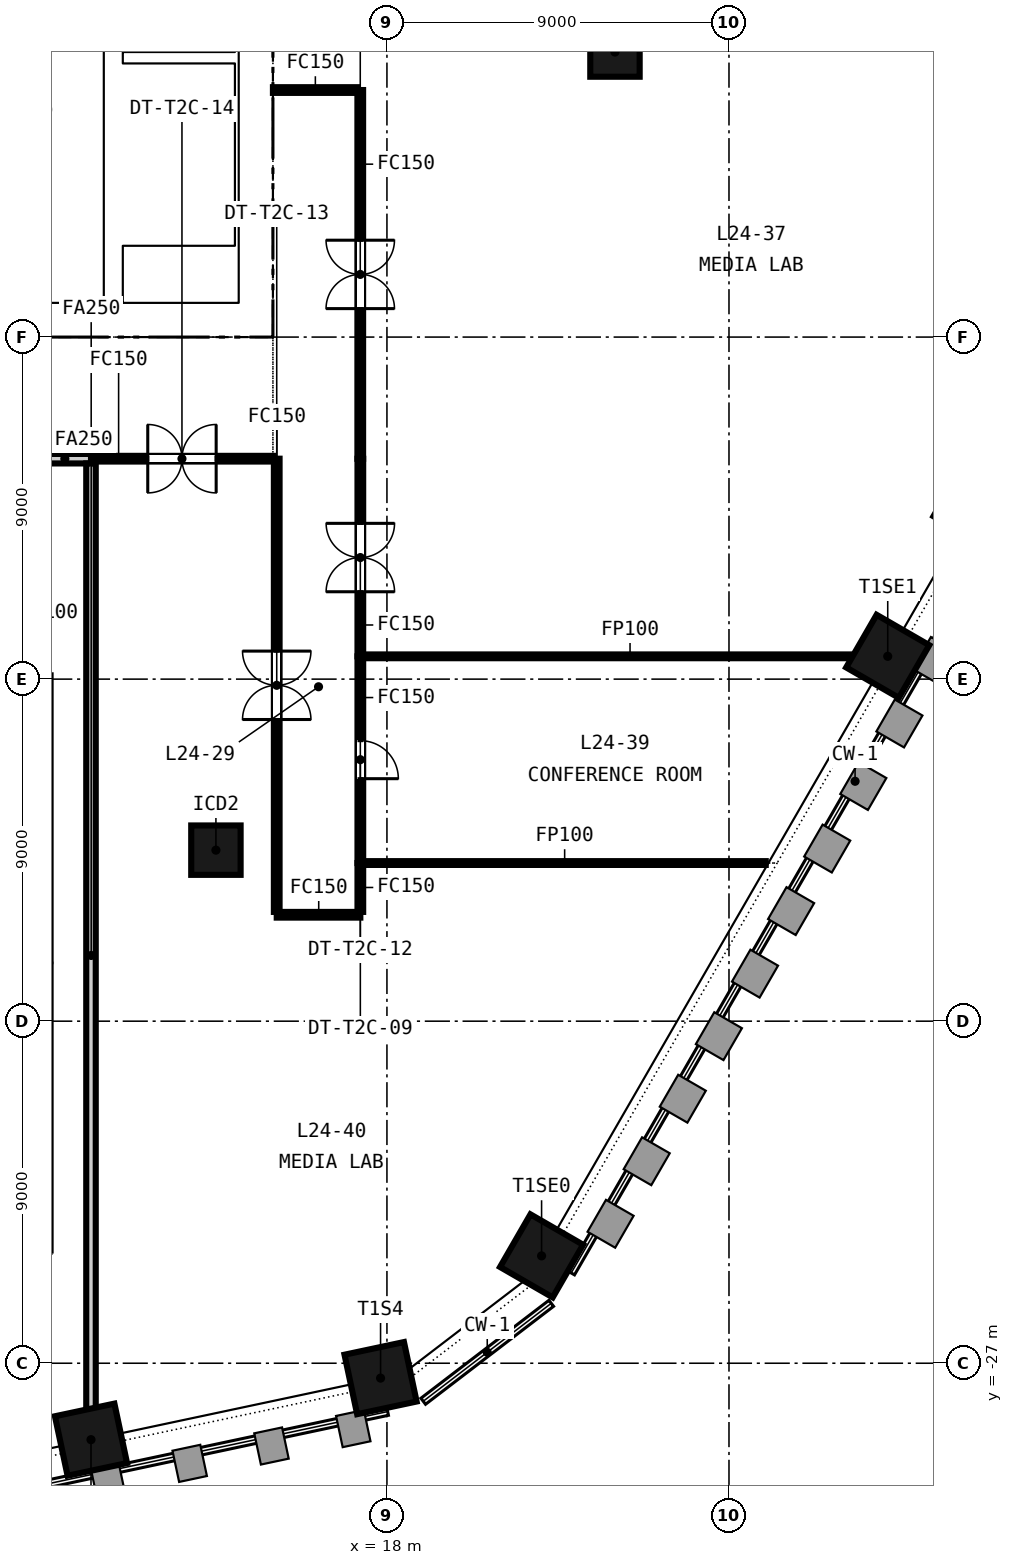
"""IFC4 building model, lengths in metres.
Left out: names, types, materials, properties, quantities, classifications, styles, units other than length and angle.
Written with IfcOpenShell. Run it as: python <this file> out.ifc"""

import sys

from ifc_helpers import new_model, si_unit, direction, frame, frame_2d, origin, origin_2d, place, context, subcontext, project, spatial, rectangle, extrude, element, fill, save


model = new_model("IFC4")
c1 = context("Model", 3, precision=1e-05, world=origin(), true_north=direction((0.0, 1.0)))
c2 = subcontext(c1, "Body", "Model", "MODEL_VIEW")
j1 = project(units=[si_unit("LENGTHUNIT", "METRE"), si_unit("PLANEANGLEUNIT", "RADIAN")], contexts=[c1])
p1 = place(None, origin())
s1 = spatial("IfcSite", under=j1, at=p1, CompositionType="ELEMENT")
p2 = place(p1, origin())
s2 = spatial("IfcBuilding", under=s1, at=p2, CompositionType="ELEMENT")
p3 = place(p2, frame((0.0, 0.0, 102.55)))
s3 = spatial("IfcBuildingStorey", under=s2, at=p3, CompositionType="ELEMENT", Elevation=102.55)
p4 = place(p3, frame((-15.0, 0.45, -0.15), z_axis=(0.0, 0.0, 1.0), x_axis=(1.0, 0.0, 0.0)))
e1 = element("IfcWall", 1, at=p4, inside=s3, PredefinedType="SOLIDWALL", context=c2, shape_type="SweptSolid", body=[
    extrude(rectangle(XDim=30.0, YDim=0.9, at=frame_2d((15.0, 0.0))), origin(), (0.0, 0.0, 1.0), 3.65),
])
p5 = place(p4, frame((5.8, 0.0, 0.15)))
e2 = element("IfcOpeningElement", 2, at=p5, cuts=e1, PredefinedType="OPENING", context=c2, shape_type="SweptSolid", body=[
    extrude(rectangle(XDim=2.4, YDim=2.4, at=frame_2d((1.2, 1.2))), frame((0.0, 0.46, 0.0), z_axis=(0.0, -1.0, 0.0), x_axis=(1.0, 0.0, 0.0)), (0.0, 0.0, 1.0), 0.92),
])
p6 = place(p4, frame((13.8, 0.0, 0.15)))
e3 = element("IfcOpeningElement", 3, at=p6, cuts=e1, PredefinedType="OPENING", context=c2, shape_type="SweptSolid", body=[
    extrude(rectangle(XDim=2.4, YDim=2.4, at=frame_2d((1.2, 1.2))), frame((0.0, 0.46, 0.0), z_axis=(0.0, -1.0, 0.0), x_axis=(1.0, 0.0, 0.0)), (0.0, 0.0, 1.0), 0.92),
])
p7 = place(p4, frame((21.8, 0.0, 0.15)))
e4 = element("IfcOpeningElement", 4, at=p7, cuts=e1, PredefinedType="OPENING", context=c2, shape_type="SweptSolid", body=[
    extrude(rectangle(XDim=2.4, YDim=2.4, at=frame_2d((1.2, 1.2))), frame((0.0, 0.46, 0.0), z_axis=(0.0, -1.0, 0.0), x_axis=(1.0, 0.0, 0.0)), (0.0, 0.0, 1.0), 0.92),
])
p8 = place(p4, frame((1.5, 0.0, 0.15)))
e5 = element("IfcOpeningElement", 5, at=p8, cuts=e1, PredefinedType="OPENING", context=c2, shape_type="SweptSolid", body=[
    extrude(rectangle(XDim=1.2, YDim=2.1, at=frame_2d((0.6, 1.05))), frame((0.0, 0.46, 0.0), z_axis=(0.0, -1.0, 0.0), x_axis=(1.0, 0.0, 0.0)), (0.0, 0.0, 1.0), 0.92),
])
p9 = place(p4, frame((27.3, 0.0, 0.15)))
e6 = element("IfcOpeningElement", 6, at=p9, cuts=e1, PredefinedType="OPENING", context=c2, shape_type="SweptSolid", body=[
    extrude(rectangle(XDim=1.2, YDim=2.1, at=frame_2d((0.6, 1.05))), frame((0.0, 0.46, 0.0), z_axis=(0.0, -1.0, 0.0), x_axis=(1.0, 0.0, 0.0)), (0.0, 0.0, 1.0), 0.92),
])
p10 = place(p3, frame((14.55, 0.9, -0.15), z_axis=(0.0, 0.0, 1.0), x_axis=(0.0, 1.0, 0.0)))
e7 = element("IfcWall", 7, at=p10, inside=s3, PredefinedType="SOLIDWALL", context=c2, shape_type="SweptSolid", body=[
    extrude(rectangle(XDim=13.2, YDim=0.9, at=frame_2d((6.6, 0.0))), origin(), (0.0, 0.0, 1.0), 3.65),
])
p11 = place(p3, frame((10.8, 0.9, -0.15), z_axis=(0.0, 0.0, 1.0), x_axis=(0.0, 1.0, 0.0)))
e8 = element("IfcWall", 8, at=p11, inside=s3, PredefinedType="SOLIDWALL", context=c2, shape_type="SweptSolid", body=[
    extrude(rectangle(XDim=13.2, YDim=0.5, at=frame_2d((6.6, 0.0))), origin(), (0.0, 0.0, 1.0), 3.65),
])
for number, where, z_axis, x_axis in (
    (9, (10.213, -29.011, -0.15), (0.0, 0.0, 1.0), (0.978, 0.208, 0.0)),
    (10, (17.832, -27.392, -0.15), (0.0, 0.0, 1.0), (0.978, 0.208, 0.0)),
    (11, (22.069, -24.175, -0.15), (0.0, 0.0, 1.0), (0.5, 0.866, 0.0)),
    (12, (31.177, -8.4, -0.15), (0.0, 0.0, 1.0), (0.5, 0.866, 0.0)),
    (13, (33.473, -4.422, -0.15), (0.0, 0.0, 1.0), (0.5, 0.866, 0.0)),
):
    element("IfcColumn", number, at=place(p3, frame(where, z_axis=z_axis, x_axis=x_axis)), inside=s3, PredefinedType="COLUMN", context=c2, shape_type="SweptSolid", body=[
        extrude(rectangle(XDim=1.6, YDim=1.6, at=origin_2d()), origin(), (0.0, 0.0, 1.0), 3.65),
    ])
for number, where, z_axis, x_axis in (
    (14, (13.5, -13.5, -0.15), (0.0, 0.0, 1.0), (1.0, 0.0, 0.0)),
    (15, (24.0, 7.5, -0.15), (0.0, 0.0, 1.0), (1.0, 0.0, 0.0)),
):
    element("IfcColumn", number, at=place(p3, frame(where, z_axis=z_axis, x_axis=x_axis)), inside=s3, PredefinedType="COLUMN", context=c2, shape_type="SweptSolid", body=[
        extrude(rectangle(XDim=1.3, YDim=1.3, at=origin_2d()), origin(), (0.0, 0.0, 1.0), 3.65),
    ])
p12 = place(p3, frame((-10.55, 3.5, 0.0), z_axis=(0.0, 0.0, 1.0), x_axis=(1.0, 0.0, 0.0)))
e16 = element("IfcWall", 16, at=p12, inside=s3, PredefinedType="PARTITIONING", context=c2, shape_type="SweptSolid", body=[
    extrude(rectangle(XDim=21.1, YDim=0.2, at=frame_2d((10.55, 0.0))), origin(), (0.0, 0.0, 1.0), 3.5),
])
p13 = place(p12, frame((0.675, 0.0, 0.0)))
e17 = element("IfcOpeningElement", 17, at=p13, cuts=e16, PredefinedType="OPENING", context=c2, shape_type="SweptSolid", body=[
    extrude(rectangle(XDim=1.2, YDim=2.1, at=frame_2d((0.6, 1.05))), frame((0.0, 0.11, 0.0), z_axis=(0.0, -1.0, 0.0), x_axis=(1.0, 0.0, 0.0)), (0.0, 0.0, 1.0), 0.22),
])
p14 = place(p12, frame((3.475, 0.0, 0.0)))
e18 = element("IfcOpeningElement", 18, at=p14, cuts=e16, PredefinedType="OPENING", context=c2, shape_type="SweptSolid", body=[
    extrude(rectangle(XDim=1.2, YDim=2.1, at=frame_2d((0.6, 1.05))), frame((0.0, 0.11, 0.0), z_axis=(0.0, -1.0, 0.0), x_axis=(1.0, 0.0, 0.0)), (0.0, 0.0, 1.0), 0.22),
])
p15 = place(p12, frame((6.275, 0.0, 0.0)))
e19 = element("IfcOpeningElement", 19, at=p15, cuts=e16, PredefinedType="OPENING", context=c2, shape_type="SweptSolid", body=[
    extrude(rectangle(XDim=1.2, YDim=2.1, at=frame_2d((0.6, 1.05))), frame((0.0, 0.11, 0.0), z_axis=(0.0, -1.0, 0.0), x_axis=(1.0, 0.0, 0.0)), (0.0, 0.0, 1.0), 0.22),
])
p16 = place(p12, frame((9.075, 0.0, 0.0)))
e20 = element("IfcOpeningElement", 20, at=p16, cuts=e16, PredefinedType="OPENING", context=c2, shape_type="SweptSolid", body=[
    extrude(rectangle(XDim=1.2, YDim=2.1, at=frame_2d((0.6, 1.05))), frame((0.0, 0.11, 0.0), z_axis=(0.0, -1.0, 0.0), x_axis=(1.0, 0.0, 0.0)), (0.0, 0.0, 1.0), 0.22),
])
p17 = place(p12, frame((11.875, 0.0, 0.0)))
e21 = element("IfcOpeningElement", 21, at=p17, cuts=e16, PredefinedType="OPENING", context=c2, shape_type="SweptSolid", body=[
    extrude(rectangle(XDim=1.2, YDim=2.1, at=frame_2d((0.6, 1.05))), frame((0.0, 0.11, 0.0), z_axis=(0.0, -1.0, 0.0), x_axis=(1.0, 0.0, 0.0)), (0.0, 0.0, 1.0), 0.22),
])
p18 = place(p12, frame((14.675, 0.0, 0.0)))
e22 = element("IfcOpeningElement", 22, at=p18, cuts=e16, PredefinedType="OPENING", context=c2, shape_type="SweptSolid", body=[
    extrude(rectangle(XDim=1.2, YDim=2.1, at=frame_2d((0.6, 1.05))), frame((0.0, 0.11, 0.0), z_axis=(0.0, -1.0, 0.0), x_axis=(1.0, 0.0, 0.0)), (0.0, 0.0, 1.0), 0.22),
])
p19 = place(p12, frame((17.475, 0.0, 0.0)))
e23 = element("IfcOpeningElement", 23, at=p19, cuts=e16, PredefinedType="OPENING", context=c2, shape_type="SweptSolid", body=[
    extrude(rectangle(XDim=1.2, YDim=2.1, at=frame_2d((0.6, 1.05))), frame((0.0, 0.11, 0.0), z_axis=(0.0, -1.0, 0.0), x_axis=(1.0, 0.0, 0.0)), (0.0, 0.0, 1.0), 0.22),
])
p20 = place(p12, frame((19.9, 0.0, 0.0)))
e24 = element("IfcOpeningElement", 24, at=p20, cuts=e16, PredefinedType="OPENING", context=c2, shape_type="SweptSolid", body=[
    extrude(rectangle(XDim=0.9, YDim=2.1, at=frame_2d((0.45, 1.05))), frame((0.0, 0.11, 0.0), z_axis=(0.0, -1.0, 0.0), x_axis=(1.0, 0.0, 0.0)), (0.0, 0.0, 1.0), 0.22),
])
p21 = place(p3, frame((-10.55, 6.025, 0.0), z_axis=(0.0, 0.0, 1.0), x_axis=(1.0, 0.0, 0.0)))
e25 = element("IfcWall", 25, at=p21, inside=s3, PredefinedType="PARTITIONING", context=c2, shape_type="SweptSolid", body=[
    extrude(rectangle(XDim=21.1, YDim=0.25, at=frame_2d((10.55, 0.0))), origin(), (0.0, 0.0, 1.0), 3.5),
])
p22 = place(p3, frame((11.05, 7.35, 0.0), z_axis=(0.0, 0.0, 1.0), x_axis=(1.0, 0.0, 0.0)))
e26 = element("IfcWall", 26, at=p22, inside=s3, PredefinedType="SOLIDWALL", context=c2, shape_type="SweptSolid", body=[
    extrude(rectangle(XDim=2.95, YDim=0.3, at=frame_2d((1.475, 0.0))), origin(), (0.0, 0.0, 1.0), 3.5),
])
p23 = place(p3, frame((14.05, 0.9, 0.0), z_axis=(0.0, 0.0, 1.0), x_axis=(0.0, 1.0, 0.0)))
e27 = element("IfcWall", 27, at=p23, inside=s3, PredefinedType="SOLIDWALL", context=c2, shape_type="SweptSolid", body=[
    extrude(rectangle(XDim=13.2, YDim=0.1, at=frame_2d((6.6, 0.0))), origin(), (0.0, 0.0, 1.0), 3.5),
])
p24 = place(p3, frame((15.0, -3.2, 0.0), z_axis=(0.0, 0.0, 1.0), x_axis=(-1.0, 0.0, 0.0)))
e28 = element("IfcWall", 28, at=p24, inside=s3, PredefinedType="PARTITIONING", context=c2, shape_type="SweptSolid", body=[
    extrude(rectangle(XDim=4.787, YDim=0.15, at=frame_2d((2.394, 0.0))), origin(), (0.0, 0.0, 1.0), 2.741),
])
p25 = place(p24, frame((1.493, 0.0, 0.0)))
e29 = element("IfcOpeningElement", 29, at=p25, cuts=e28, PredefinedType="OPENING", context=c2, shape_type="SweptSolid", body=[
    extrude(rectangle(XDim=1.8, YDim=2.1, at=frame_2d((0.9, 1.05))), frame((0.0, 0.085, 0.0), z_axis=(0.0, -1.0, 0.0), x_axis=(1.0, 0.0, 0.0)), (0.0, 0.0, 1.0), 0.17),
])
p26 = place(p3, frame((10.213, -3.2, 0.0), z_axis=(0.0, 0.0, 1.0), x_axis=(-1.0, 0.0, 0.0)))
e30 = element("IfcWall", 30, at=p26, inside=s3, PredefinedType="PARTITIONING", context=c2, shape_type="SweptSolid", body=[
    extrude(rectangle(XDim=4.674, YDim=0.25, at=frame_2d((2.337, 0.0))), origin(), (0.0, 0.0, 1.0), 2.741),
])
p27 = place(p26, frame((1.437, 0.0, 0.0)))
e31 = element("IfcOpeningElement", 31, at=p27, cuts=e30, PredefinedType="OPENING", context=c2, shape_type="SweptSolid", body=[
    extrude(rectangle(XDim=1.8, YDim=2.1, at=frame_2d((0.9, 1.05))), frame((0.0, 0.135, 0.0), z_axis=(0.0, -1.0, 0.0), x_axis=(1.0, 0.0, 0.0)), (0.0, 0.0, 1.0), 0.27),
])
p28 = place(p3, frame((17.298, 6.5, 0.0), z_axis=(0.0, 0.0, 1.0), x_axis=(0.0, -1.0, 0.0)))
e32 = element("IfcWall", 32, at=p28, inside=s3, PredefinedType="PARTITIONING", context=c2, shape_type="SweptSolid", body=[
    extrude(rectangle(XDim=9.702, YDim=0.15, at=frame_2d((4.851, 0.0))), origin(), (0.0, 0.0, 1.0), 2.741),
])
p29 = place(p28, frame((3.951, 0.0, 0.0)))
e33 = element("IfcOpeningElement", 33, at=p29, cuts=e32, PredefinedType="OPENING", context=c2, shape_type="SweptSolid", body=[
    extrude(rectangle(XDim=1.8, YDim=2.1, at=frame_2d((0.9, 1.05))), frame((0.0, 0.085, 0.0), z_axis=(0.0, -1.0, 0.0), x_axis=(1.0, 0.0, 0.0)), (0.0, 0.0, 1.0), 0.17),
])
p30 = place(p3, frame((17.3, -3.202, 0.0), z_axis=(0.0, 0.0, 1.0), x_axis=(0.0, -1.0, 0.0)))
e34 = element("IfcWall", 34, at=p30, inside=s3, PredefinedType="PARTITIONING", context=c2, shape_type="SweptSolid", body=[
    extrude(rectangle(XDim=5.198, YDim=0.15, at=frame_2d((2.599, 0.0))), origin(), (0.0, 0.0, 1.0), 2.741),
])
p31 = place(p30, frame((1.699, 0.0, 0.0)))
e35 = element("IfcOpeningElement", 35, at=p31, cuts=e34, PredefinedType="OPENING", context=c2, shape_type="SweptSolid", body=[
    extrude(rectangle(XDim=1.8, YDim=2.1, at=frame_2d((0.9, 1.05))), frame((0.0, 0.085, 0.0), z_axis=(0.0, -1.0, 0.0), x_axis=(1.0, 0.0, 0.0)), (0.0, 0.0, 1.0), 0.17),
])
p32 = place(p3, frame((17.3, -8.4, 0.0), z_axis=(0.0, 0.0, 1.0), x_axis=(0.0, -1.0, 0.0)))
e36 = element("IfcWall", 36, at=p32, inside=s3, PredefinedType="PARTITIONING", context=c2, shape_type="SweptSolid", body=[
    extrude(rectangle(XDim=5.439, YDim=0.15, at=frame_2d((2.72, 0.0))), origin(), (0.0, 0.0, 1.0), 2.741),
])
p33 = place(p32, frame((2.219, 0.0, 0.0)))
e37 = element("IfcOpeningElement", 37, at=p33, cuts=e36, PredefinedType="OPENING", context=c2, shape_type="SweptSolid", body=[
    extrude(rectangle(XDim=1.0, YDim=2.1, at=frame_2d((0.5, 1.05))), frame((0.0, 0.085, 0.0), z_axis=(0.0, -1.0, 0.0), x_axis=(1.0, 0.0, 0.0)), (0.0, 0.0, 1.0), 0.17),
])
p34 = place(p3, frame((17.3, -15.2, 0.0), z_axis=(0.0, 0.0, 1.0), x_axis=(-1.0, 0.0, 0.0)))
e38 = element("IfcWall", 38, at=p34, inside=s3, PredefinedType="PARTITIONING", context=c2, shape_type="SweptSolid", body=[
    extrude(rectangle(XDim=2.2, YDim=0.15, at=frame_2d((1.1, 0.0))), origin(), (0.0, 0.0, 1.0), 2.741),
])
p35 = place(p3, frame((17.3, -13.839, 0.0), z_axis=(0.0, 0.0, 1.0), x_axis=(0.0, -1.0, 0.0)))
e39 = element("IfcWall", 39, at=p35, inside=s3, PredefinedType="PARTITIONING", context=c2, shape_type="SweptSolid", body=[
    extrude(rectangle(XDim=1.286, YDim=0.15, at=frame_2d((0.643, 0.0))), origin(), (0.0, 0.0, 1.0), 2.741),
])
p36 = place(p3, frame((15.0, 6.5, 0.0), z_axis=(0.0, 0.0, 1.0), x_axis=(1.0, 0.0, 0.0)))
e40 = element("IfcWall", 40, at=p36, inside=s3, PredefinedType="PARTITIONING", context=c2, shape_type="SweptSolid", body=[
    extrude(rectangle(XDim=2.223, YDim=0.15, at=frame_2d((1.111, 0.0))), origin(), (0.0, 0.0, 1.0), 2.741),
])
p37 = place(p3, frame((17.375, -8.4, 0.0), z_axis=(0.0, 0.0, 1.0), x_axis=(1.0, 0.0, 0.0)))
e41 = element("IfcWall", 41, at=p37, inside=s3, PredefinedType="PARTITIONING", context=c2, shape_type="SweptSolid", body=[
    extrude(rectangle(XDim=14.033, YDim=0.1, at=frame_2d((7.017, 0.0))), origin(), (0.0, 0.0, 1.0), 2.741),
])
p38 = place(p3, frame((17.375, -13.839, 0.0), z_axis=(0.0, 0.0, 1.0), x_axis=(1.0, 0.0, 0.0)))
e42 = element("IfcWall", 42, at=p38, inside=s3, PredefinedType="PARTITIONING", context=c2, shape_type="SweptSolid", body=[
    extrude(rectangle(XDim=10.592, YDim=0.1, at=frame_2d((5.296, 0.0))), origin(), (0.0, 0.0, 1.0), 2.741),
])
p39 = place(p3, frame((15.1, -15.125, 0.0), z_axis=(0.0, 0.0, 1.0), x_axis=(0.0, 1.0, 0.0)))
e43 = element("IfcWall", 43, at=p39, inside=s3, PredefinedType="PARTITIONING", context=c2, shape_type="SweptSolid", body=[
    extrude(rectangle(XDim=11.925, YDim=0.15, at=frame_2d((5.962, 0.0))), origin(), (0.0, 0.0, 1.0), 2.741),
])
p40 = place(p39, frame((5.062, 0.0, 0.0)))
e44 = element("IfcOpeningElement", 44, at=p40, cuts=e43, PredefinedType="OPENING", context=c2, shape_type="SweptSolid", body=[
    extrude(rectangle(XDim=1.8, YDim=2.1, at=frame_2d((0.9, 1.05))), frame((0.0, 0.085, 0.0), z_axis=(0.0, -1.0, 0.0), x_axis=(1.0, 0.0, 0.0)), (0.0, 0.0, 1.0), 0.17),
])
p41 = place(p3, frame((10.213, -29.216, 0.0), z_axis=(0.0, 0.0, 1.0), x_axis=(0.0, 1.0, 0.0)))
e45 = element("IfcWall", 45, at=p41, inside=s3, PredefinedType="PARTITIONING", context=c2, shape_type="SweptSolid", body=[
    extrude(rectangle(XDim=25.891, YDim=0.25, at=frame_2d((12.946, 0.0))), origin(), (0.0, 0.0, 1.0), 2.741),
])
p42 = place(p20, origin())
e46 = element("IfcDoor", 46, at=p42, inside=s3, OperationType="SINGLE_SWING_RIGHT", PredefinedType="DOOR", context=c2, shape_type="SweptSolid", body=[
    extrude(rectangle(XDim=0.9, YDim=2.1, at=frame_2d((0.45, 1.05))), frame((0.0, 0.025, 0.0), z_axis=(0.0, -1.0, 0.0), x_axis=(1.0, 0.0, 0.0)), (0.0, 0.0, 1.0), 0.05),
])
fill(e24, e46)
p43 = place(p9, origin())
e47 = element("IfcDoor", 47, at=p43, inside=s3, OperationType="SINGLE_SWING_RIGHT", PredefinedType="DOOR", context=c2, shape_type="SweptSolid", body=[
    extrude(rectangle(XDim=1.2, YDim=2.1, at=frame_2d((0.6, 1.05))), frame((0.0, 0.025, 0.0), z_axis=(0.0, -1.0, 0.0), x_axis=(1.0, 0.0, 0.0)), (0.0, 0.0, 1.0), 0.05),
])
fill(e6, e47)
p44 = place(p29, origin())
e48 = element("IfcDoor", 48, at=p44, inside=s3, OperationType="DOUBLE_DOOR_DOUBLE_SWING", PredefinedType="DOOR", context=c2, shape_type="SweptSolid", body=[
    extrude(rectangle(XDim=1.8, YDim=2.1, at=frame_2d((0.9, 1.05))), frame((0.0, 0.025, 0.0), z_axis=(0.0, -1.0, 0.0), x_axis=(1.0, 0.0, 0.0)), (0.0, 0.0, 1.0), 0.05),
])
fill(e33, e48)
p45 = place(p31, origin())
e49 = element("IfcDoor", 49, at=p45, inside=s3, OperationType="DOUBLE_DOOR_DOUBLE_SWING", PredefinedType="DOOR", context=c2, shape_type="SweptSolid", body=[
    extrude(rectangle(XDim=1.8, YDim=2.1, at=frame_2d((0.9, 1.05))), frame((0.0, 0.025, 0.0), z_axis=(0.0, -1.0, 0.0), x_axis=(1.0, 0.0, 0.0)), (0.0, 0.0, 1.0), 0.05),
])
fill(e35, e49)
p46 = place(p33, origin())
e50 = element("IfcDoor", 50, at=p46, inside=s3, OperationType="SINGLE_SWING_RIGHT", PredefinedType="DOOR", context=c2, shape_type="SweptSolid", body=[
    extrude(rectangle(XDim=1.0, YDim=2.1, at=frame_2d((0.5, 1.05))), frame((0.0, 0.025, 0.0), z_axis=(0.0, -1.0, 0.0), x_axis=(1.0, 0.0, 0.0)), (0.0, 0.0, 1.0), 0.05),
])
fill(e37, e50)
p47 = place(p40, origin())
e51 = element("IfcDoor", 51, at=p47, inside=s3, OperationType="DOUBLE_DOOR_DOUBLE_SWING", PredefinedType="DOOR", context=c2, shape_type="SweptSolid", body=[
    extrude(rectangle(XDim=1.8, YDim=2.1, at=frame_2d((0.9, 1.05))), frame((0.0, 0.025, 0.0), z_axis=(0.0, -1.0, 0.0), x_axis=(1.0, 0.0, 0.0)), (0.0, 0.0, 1.0), 0.05),
])
fill(e44, e51)
p48 = place(p25, origin())
e52 = element("IfcDoor", 52, at=p48, inside=s3, OperationType="DOUBLE_DOOR_DOUBLE_SWING", PredefinedType="DOOR", context=c2, shape_type="SweptSolid", body=[
    extrude(rectangle(XDim=1.8, YDim=2.1, at=frame_2d((0.9, 1.05))), frame((0.0, 0.025, 0.0), z_axis=(0.0, -1.0, 0.0), x_axis=(1.0, 0.0, 0.0)), (0.0, 0.0, 1.0), 0.05),
])
fill(e29, e52)
save(model, sys.argv[1])
